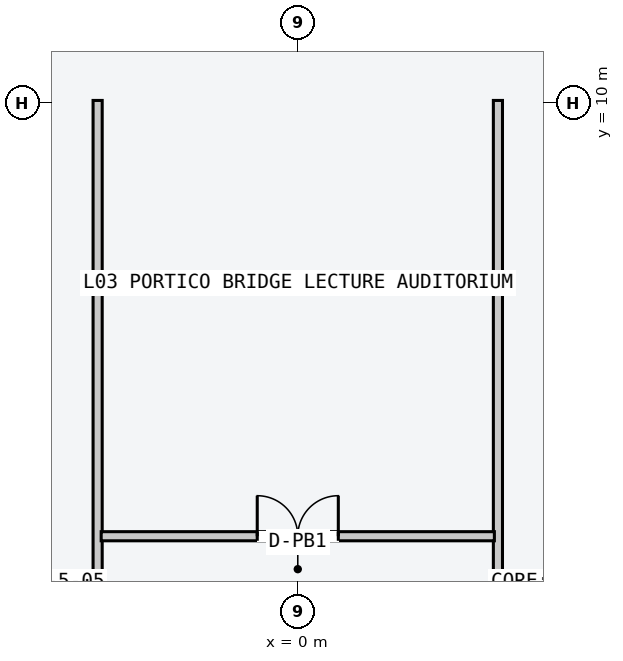
"""IFC4 building model, lengths in metres.
Left out: names, types, materials, properties, quantities, classifications, styles, units other than length and angle.
Written with IfcOpenShell. Run it as: python <this file> out.ifc"""

import sys

from ifc_helpers import new_model, si_unit, direction, frame, frame_2d, origin, place, context, subcontext, project, spatial, rectangle, extrude, element, fill, save


model = new_model("IFC4")
c1 = context("Model", 3, precision=1e-05, world=origin(), true_north=direction((0.0, 1.0)))
c2 = subcontext(c1, "Body", "Model", "MODEL_VIEW")
j1 = project(units=[si_unit("LENGTHUNIT", "METRE"), si_unit("PLANEANGLEUNIT", "RADIAN")], contexts=[c1])
p1 = place(None, origin())
s1 = spatial("IfcSite", under=j1, at=p1, CompositionType="ELEMENT")
p2 = place(p1, origin())
s2 = spatial("IfcBuilding", under=s1, at=p2, CompositionType="ELEMENT")
p3 = place(p2, frame((0.0, 0.0, 14.4)))
s3 = spatial("IfcBuildingStorey", under=s2, at=p3, CompositionType="ELEMENT", Elevation=14.4)
for number, where, z_axis, x_axis in (
    (1, (-3.95, -10.05, 0.0), (0.0, 0.0, 1.0), (0.0, 1.0, 0.0)),
    (2, (3.95, -10.05, 0.0), (0.0, 0.0, 1.0), (0.0, 1.0, 0.0)),
):
    element("IfcWall", number, at=place(p3, frame(where, z_axis=z_axis, x_axis=x_axis)), inside=s3, PredefinedType="PARTITIONING", context=c2, shape_type="SweptSolid", body=[
        extrude(rectangle(XDim=20.1, YDim=0.18, at=frame_2d((10.05, 0.0))), origin(), (0.0, 0.0, 1.0), 4.58),
    ])
p4 = place(p3, frame((-3.88, 1.45, 0.0), z_axis=(0.0, 0.0, 1.0), x_axis=(1.0, 0.0, 0.0)))
e3 = element("IfcWall", 3, at=p4, inside=s3, PredefinedType="PARTITIONING", context=c2, shape_type="SweptSolid", body=[
    extrude(rectangle(XDim=7.76, YDim=0.18, at=frame_2d((3.88, 0.0))), origin(), (0.0, 0.0, 1.0), 4.58),
])
p5 = place(p4, frame((3.08, 0.0, 0.0)))
e4 = element("IfcOpeningElement", 4, at=p5, cuts=e3, PredefinedType="OPENING", context=c2, shape_type="SweptSolid", body=[
    extrude(rectangle(XDim=1.6, YDim=2.3, at=frame_2d((0.8, 1.15))), frame((0.0, 0.1, 0.0), z_axis=(0.0, -1.0, 0.0), x_axis=(1.0, 0.0, 0.0)), (0.0, 0.0, 1.0), 0.2),
])
p6 = place(p5, origin())
e5 = element("IfcDoor", 5, at=p6, inside=s3, OperationType="DOUBLE_DOOR_SINGLE_SWING", PredefinedType="DOOR", context=c2, shape_type="SweptSolid", body=[
    extrude(rectangle(XDim=1.6, YDim=2.3, at=frame_2d((0.8, 1.15))), frame((0.0, 0.025, 0.0), z_axis=(0.0, -1.0, 0.0), x_axis=(1.0, 0.0, 0.0)), (0.0, 0.0, 1.0), 0.05),
])
fill(e4, e5)
save(model, sys.argv[1])
